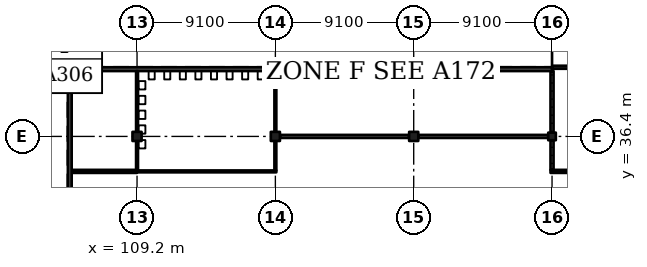
"""IFC4 building model, lengths in metres.
Left out: names, types, materials, properties, quantities, classifications, styles, units other than length and angle.
Written with IfcOpenShell. Run it as: python <this file> out.ifc"""

import sys

from ifc_helpers import new_model, si_unit, direction, frame, frame_2d, origin, origin_2d, place, context, subcontext, project, spatial, rectangle, extrude, element, fill, save


model = new_model("IFC4")
c1 = context("Model", 3, precision=1e-05, world=origin(), true_north=direction((0.0, 1.0)))
c2 = subcontext(c1, "Body", "Model", "MODEL_VIEW")
j1 = project(units=[si_unit("LENGTHUNIT", "METRE"), si_unit("PLANEANGLEUNIT", "RADIAN")], contexts=[c1])
p1 = place(None, origin())
s1 = spatial("IfcSite", under=j1, at=p1, CompositionType="ELEMENT")
p2 = place(p1, origin())
s2 = spatial("IfcBuilding", under=s1, at=p2, CompositionType="ELEMENT")
p3 = place(p2, frame((0.0, 0.0, 24.57)))
s3 = spatial("IfcBuildingStorey", under=s2, at=p3, CompositionType="ELEMENT", Elevation=24.57)
for number, where, z_axis, x_axis in (
    (1, (109.2, 36.4, 0.0), (0.0, 0.0, 1.0), (1.0, 0.0, 0.0)),
    (2, (118.3, 36.4, 0.0), (0.0, 0.0, 1.0), (1.0, 0.0, 0.0)),
    (3, (127.4, 36.4, 0.0), (0.0, 0.0, 1.0), (1.0, 0.0, 0.0)),
):
    element("IfcColumn", number, at=place(p3, frame(where, z_axis=z_axis, x_axis=x_axis)), inside=s3, PredefinedType="COLUMN", context=c2, shape_type="SweptSolid", body=[
        extrude(rectangle(XDim=0.6, YDim=0.6, at=origin_2d()), origin(), (0.0, 0.0, 1.0), 4.55),
    ])
p4 = place(p3, frame((136.5, 36.4, 0.0), z_axis=(0.0, 0.0, 1.0), x_axis=(1.0, 0.0, 0.0)))
e4 = element("IfcColumn", 4, at=p4, inside=s3, PredefinedType="COLUMN", context=c2, shape_type="SweptSolid", body=[
    extrude(rectangle(XDim=0.5, YDim=0.5, at=origin_2d()), origin(), (0.0, 0.0, 1.0), 4.55),
])
p5 = place(p3, frame((104.775, 40.95, 0.0), z_axis=(0.0, 0.0, 1.0), x_axis=(0.0, -1.0, 0.0)))
e5 = element("IfcWall", 5, at=p5, inside=s3, PredefinedType="SHEAR", context=c2, shape_type="SweptSolid", body=[
    extrude(rectangle(XDim=31.85, YDim=0.25, at=frame_2d((15.925, 0.0))), origin(), (0.0, 0.0, 1.0), 4.55),
])
p6 = place(p3, frame((104.65, 40.825, 0.0), z_axis=(0.0, 0.0, 1.0), x_axis=(1.0, 0.0, 0.0)))
e6 = element("IfcWall", 6, at=p6, inside=s3, PredefinedType="SHEAR", context=c2, shape_type="SweptSolid", body=[
    extrude(rectangle(XDim=31.85, YDim=0.25, at=frame_2d((15.925, 0.0))), origin(), (0.0, 0.0, 1.0), 4.55),
])
p7 = place(p3, frame((109.2, 34.1, 0.0), z_axis=(0.0, 0.0, 1.0), x_axis=(-1.0, 0.0, 0.0)))
e7 = element("IfcWall", 7, at=p7, inside=s3, PredefinedType="PARTITIONING", context=c2, shape_type="SweptSolid", body=[
    extrude(rectangle(XDim=4.3, YDim=0.2, at=frame_2d((2.15, 0.0))), origin(), (0.0, 0.0, 1.0), 4.35),
])
p8 = place(p7, frame((1.25, 0.0, 0.0)))
e8 = element("IfcOpeningElement", 8, at=p8, cuts=e7, PredefinedType="OPENING", context=c2, shape_type="SweptSolid", body=[
    extrude(rectangle(XDim=1.8, YDim=2.1, at=frame_2d((0.9, 1.05))), frame((0.0, 0.11, 0.0), z_axis=(0.0, -1.0, 0.0), x_axis=(1.0, 0.0, 0.0)), (0.0, 0.0, 1.0), 0.22),
])
p9 = place(p3, frame((109.2, 34.2, 0.0), z_axis=(0.0, 0.0, 1.0), x_axis=(0.0, 1.0, 0.0)))
e9 = element("IfcWall", 9, at=p9, inside=s3, PredefinedType="PARTITIONING", context=c2, shape_type="SweptSolid", body=[
    extrude(rectangle(XDim=1.9, YDim=0.125, at=frame_2d((0.95, 0.0))), origin(), (0.0, 0.0, 1.0), 3.6),
])
p10 = place(p3, frame((109.2, 36.7, 0.0), z_axis=(0.0, 0.0, 1.0), x_axis=(0.0, 1.0, 0.0)))
e10 = element("IfcWall", 10, at=p10, inside=s3, PredefinedType="PARTITIONING", context=c2, shape_type="SweptSolid", body=[
    extrude(rectangle(XDim=4.0, YDim=0.125, at=frame_2d((2.0, 0.0))), origin(), (0.0, 0.0, 1.0), 4.35),
])
p11 = place(p3, frame((118.3, 36.1, 0.0), z_axis=(0.0, 0.0, 1.0), x_axis=(0.0, -1.0, 0.0)))
e11 = element("IfcWall", 11, at=p11, inside=s3, PredefinedType="PARTITIONING", context=c2, shape_type="SweptSolid", body=[
    extrude(rectangle(XDim=1.938, YDim=0.125, at=frame_2d((0.969, 0.0))), origin(), (0.0, 0.0, 1.0), 3.6),
])
p12 = place(p3, frame((118.3, 36.7, 0.0), z_axis=(0.0, 0.0, 1.0), x_axis=(0.0, 1.0, 0.0)))
e12 = element("IfcWall", 12, at=p12, inside=s3, PredefinedType="PARTITIONING", context=c2, shape_type="SweptSolid", body=[
    extrude(rectangle(XDim=4.0, YDim=0.125, at=frame_2d((2.0, 0.0))), origin(), (0.0, 0.0, 1.0), 4.35),
])
p13 = place(p3, frame((118.363, 34.1, 0.0), z_axis=(0.0, 0.0, 1.0), x_axis=(-1.0, 0.0, 0.0)))
e13 = element("IfcWall", 13, at=p13, inside=s3, PredefinedType="PARTITIONING", context=c2, shape_type="SweptSolid", body=[
    extrude(rectangle(XDim=9.163, YDim=0.125, at=frame_2d((4.581, 0.0))), origin(), (0.0, 0.0, 1.0), 4.35),
])
p14 = place(p13, frame((4.15, 0.0, 0.0)))
e14 = element("IfcOpeningElement", 14, at=p14, cuts=e13, PredefinedType="OPENING", context=c2, shape_type="SweptSolid", body=[
    extrude(rectangle(XDim=0.9, YDim=2.1, at=frame_2d((0.45, 1.05))), frame((0.0, 0.073, 0.0), z_axis=(0.0, -1.0, 0.0), x_axis=(1.0, 0.0, 0.0)), (0.0, 0.0, 1.0), 0.145),
])
p15 = place(p3, frame((127.1, 36.4, 0.0), z_axis=(0.0, 0.0, 1.0), x_axis=(-1.0, 0.0, 0.0)))
e15 = element("IfcWall", 15, at=p15, inside=s3, PredefinedType="PARTITIONING", context=c2, shape_type="SweptSolid", body=[
    extrude(rectangle(XDim=8.5, YDim=0.2, at=frame_2d((4.25, 0.0))), origin(), (0.0, 0.0, 1.0), 3.6),
])
p16 = place(p3, frame((136.25, 36.4, 0.0), z_axis=(0.0, 0.0, 1.0), x_axis=(-1.0, 0.0, 0.0)))
e16 = element("IfcWall", 16, at=p16, inside=s3, PredefinedType="PARTITIONING", context=c2, shape_type="SweptSolid", body=[
    extrude(rectangle(XDim=8.55, YDim=0.2, at=frame_2d((4.275, 0.0))), origin(), (0.0, 0.0, 1.0), 3.6),
])
p17 = place(p16, frame((3.35, 0.0, 0.0)))
e17 = element("IfcOpeningElement", 17, at=p17, cuts=e16, PredefinedType="OPENING", context=c2, shape_type="SweptSolid", body=[
    extrude(rectangle(XDim=1.8, YDim=2.1, at=frame_2d((0.9, 1.05))), frame((0.0, 0.11, 0.0), z_axis=(0.0, -1.0, 0.0), x_axis=(1.0, 0.0, 0.0)), (0.0, 0.0, 1.0), 0.22),
])
p18 = place(p3, frame((136.4, 34.1, 0.0), z_axis=(0.0, 0.0, 1.0), x_axis=(1.0, 0.0, 0.0)))
e18 = element("IfcWall", 18, at=p18, inside=s3, PredefinedType="PARTITIONING", context=c2, shape_type="SweptSolid", body=[
    extrude(rectangle(XDim=9.0, YDim=0.2, at=frame_2d((4.5, 0.0))), origin(), (0.0, 0.0, 1.0), 4.35),
])
p19 = place(p18, frame((1.05, 0.0, 0.0)))
e19 = element("IfcOpeningElement", 19, at=p19, cuts=e18, PredefinedType="OPENING", context=c2, shape_type="SweptSolid", body=[
    extrude(rectangle(XDim=2.4, YDim=2.4, at=frame_2d((1.2, 1.2))), frame((0.0, 0.11, 0.0), z_axis=(0.0, -1.0, 0.0), x_axis=(1.0, 0.0, 0.0)), (0.0, 0.0, 1.0), 0.22),
])
p20 = place(p18, frame((5.55, 0.0, 0.0)))
e20 = element("IfcOpeningElement", 20, at=p20, cuts=e18, PredefinedType="OPENING", context=c2, shape_type="SweptSolid", body=[
    extrude(rectangle(XDim=2.4, YDim=2.4, at=frame_2d((1.2, 1.2))), frame((0.0, 0.11, 0.0), z_axis=(0.0, -1.0, 0.0), x_axis=(1.0, 0.0, 0.0)), (0.0, 0.0, 1.0), 0.22),
])
p21 = place(p3, frame((136.5, 36.15, 0.0), z_axis=(0.0, 0.0, 1.0), x_axis=(0.0, -1.0, 0.0)))
e21 = element("IfcWall", 21, at=p21, inside=s3, PredefinedType="PARTITIONING", context=c2, shape_type="SweptSolid", body=[
    extrude(rectangle(XDim=1.95, YDim=0.2, at=frame_2d((0.975, 0.0))), origin(), (0.0, 0.0, 1.0), 3.6),
])
p22 = place(p3, frame((136.5, 40.7, 0.0), z_axis=(0.0, 0.0, 1.0), x_axis=(0.0, -1.0, 0.0)))
e22 = element("IfcWall", 22, at=p22, inside=s3, PredefinedType="PARTITIONING", context=c2, shape_type="SweptSolid", body=[
    extrude(rectangle(XDim=4.05, YDim=0.2, at=frame_2d((2.025, 0.0))), origin(), (0.0, 0.0, 1.0), 3.9),
])
p23 = place(p3, frame((136.53, 40.95, 0.0), z_axis=(0.0, 0.0, 1.0), x_axis=(1.0, 0.0, 0.0)))
e23 = element("IfcWall", 23, at=p23, inside=s3, PredefinedType="PARTITIONING", context=c2, shape_type="SweptSolid", body=[
    extrude(rectangle(XDim=8.97, YDim=0.2, at=frame_2d((4.485, 0.0))), origin(), (0.0, 0.0, 1.0), 3.55),
])
p24 = place(p23, frame((1.25, 0.0, 0.0)))
e24 = element("IfcOpeningElement", 24, at=p24, cuts=e23, PredefinedType="OPENING", context=c2, shape_type="SweptSolid", body=[
    extrude(rectangle(XDim=3.0, YDim=2.4, at=frame_2d((1.5, 1.2))), frame((0.0, 0.11, 0.0), z_axis=(0.0, -1.0, 0.0), x_axis=(1.0, 0.0, 0.0)), (0.0, 0.0, 1.0), 0.22),
])
p25 = place(p23, frame((5.72, 0.0, 0.0)))
e25 = element("IfcOpeningElement", 25, at=p25, cuts=e23, PredefinedType="OPENING", context=c2, shape_type="SweptSolid", body=[
    extrude(rectangle(XDim=3.0, YDim=2.4, at=frame_2d((1.5, 1.2))), frame((0.0, 0.11, 0.0), z_axis=(0.0, -1.0, 0.0), x_axis=(1.0, 0.0, 0.0)), (0.0, 0.0, 1.0), 0.22),
])
p26 = place(p17, origin())
e26 = element("IfcDoor", 26, at=p26, inside=s3, OperationType="DOUBLE_DOOR_SINGLE_SWING", PredefinedType="DOOR", context=c2, shape_type="SweptSolid", body=[
    extrude(rectangle(XDim=1.8, YDim=2.1, at=frame_2d((0.9, 1.05))), frame((0.0, 0.025, 0.0), z_axis=(0.0, -1.0, 0.0), x_axis=(1.0, 0.0, 0.0)), (0.0, 0.0, 1.0), 0.05),
])
fill(e17, e26)
p27 = place(p14, origin())
e27 = element("IfcDoor", 27, at=p27, inside=s3, OperationType="SINGLE_SWING_RIGHT", PredefinedType="DOOR", context=c2, shape_type="SweptSolid", body=[
    extrude(rectangle(XDim=0.9, YDim=2.1, at=frame_2d((0.45, 1.05))), frame((0.0, 0.025, 0.0), z_axis=(0.0, -1.0, 0.0), x_axis=(1.0, 0.0, 0.0)), (0.0, 0.0, 1.0), 0.05),
])
fill(e14, e27)
p28 = place(p8, origin())
e28 = element("IfcDoor", 28, at=p28, inside=s3, OperationType="DOUBLE_DOOR_SINGLE_SWING", PredefinedType="DOOR", context=c2, shape_type="SweptSolid", body=[
    extrude(rectangle(XDim=1.8, YDim=2.1, at=frame_2d((0.9, 1.05))), frame((0.0, 0.025, 0.0), z_axis=(0.0, -1.0, 0.0), x_axis=(1.0, 0.0, 0.0)), (0.0, 0.0, 1.0), 0.05),
])
fill(e8, e28)
p29 = place(p19, origin())
e29 = element("IfcDoor", 29, at=p29, inside=s3, OperationType="DOUBLE_DOOR_SINGLE_SWING", PredefinedType="DOOR", context=c2, shape_type="SweptSolid", body=[
    extrude(rectangle(XDim=2.4, YDim=2.4, at=frame_2d((1.2, 1.2))), frame((0.0, 0.025, 0.0), z_axis=(0.0, -1.0, 0.0), x_axis=(1.0, 0.0, 0.0)), (0.0, 0.0, 1.0), 0.05),
])
fill(e19, e29)
save(model, sys.argv[1])
